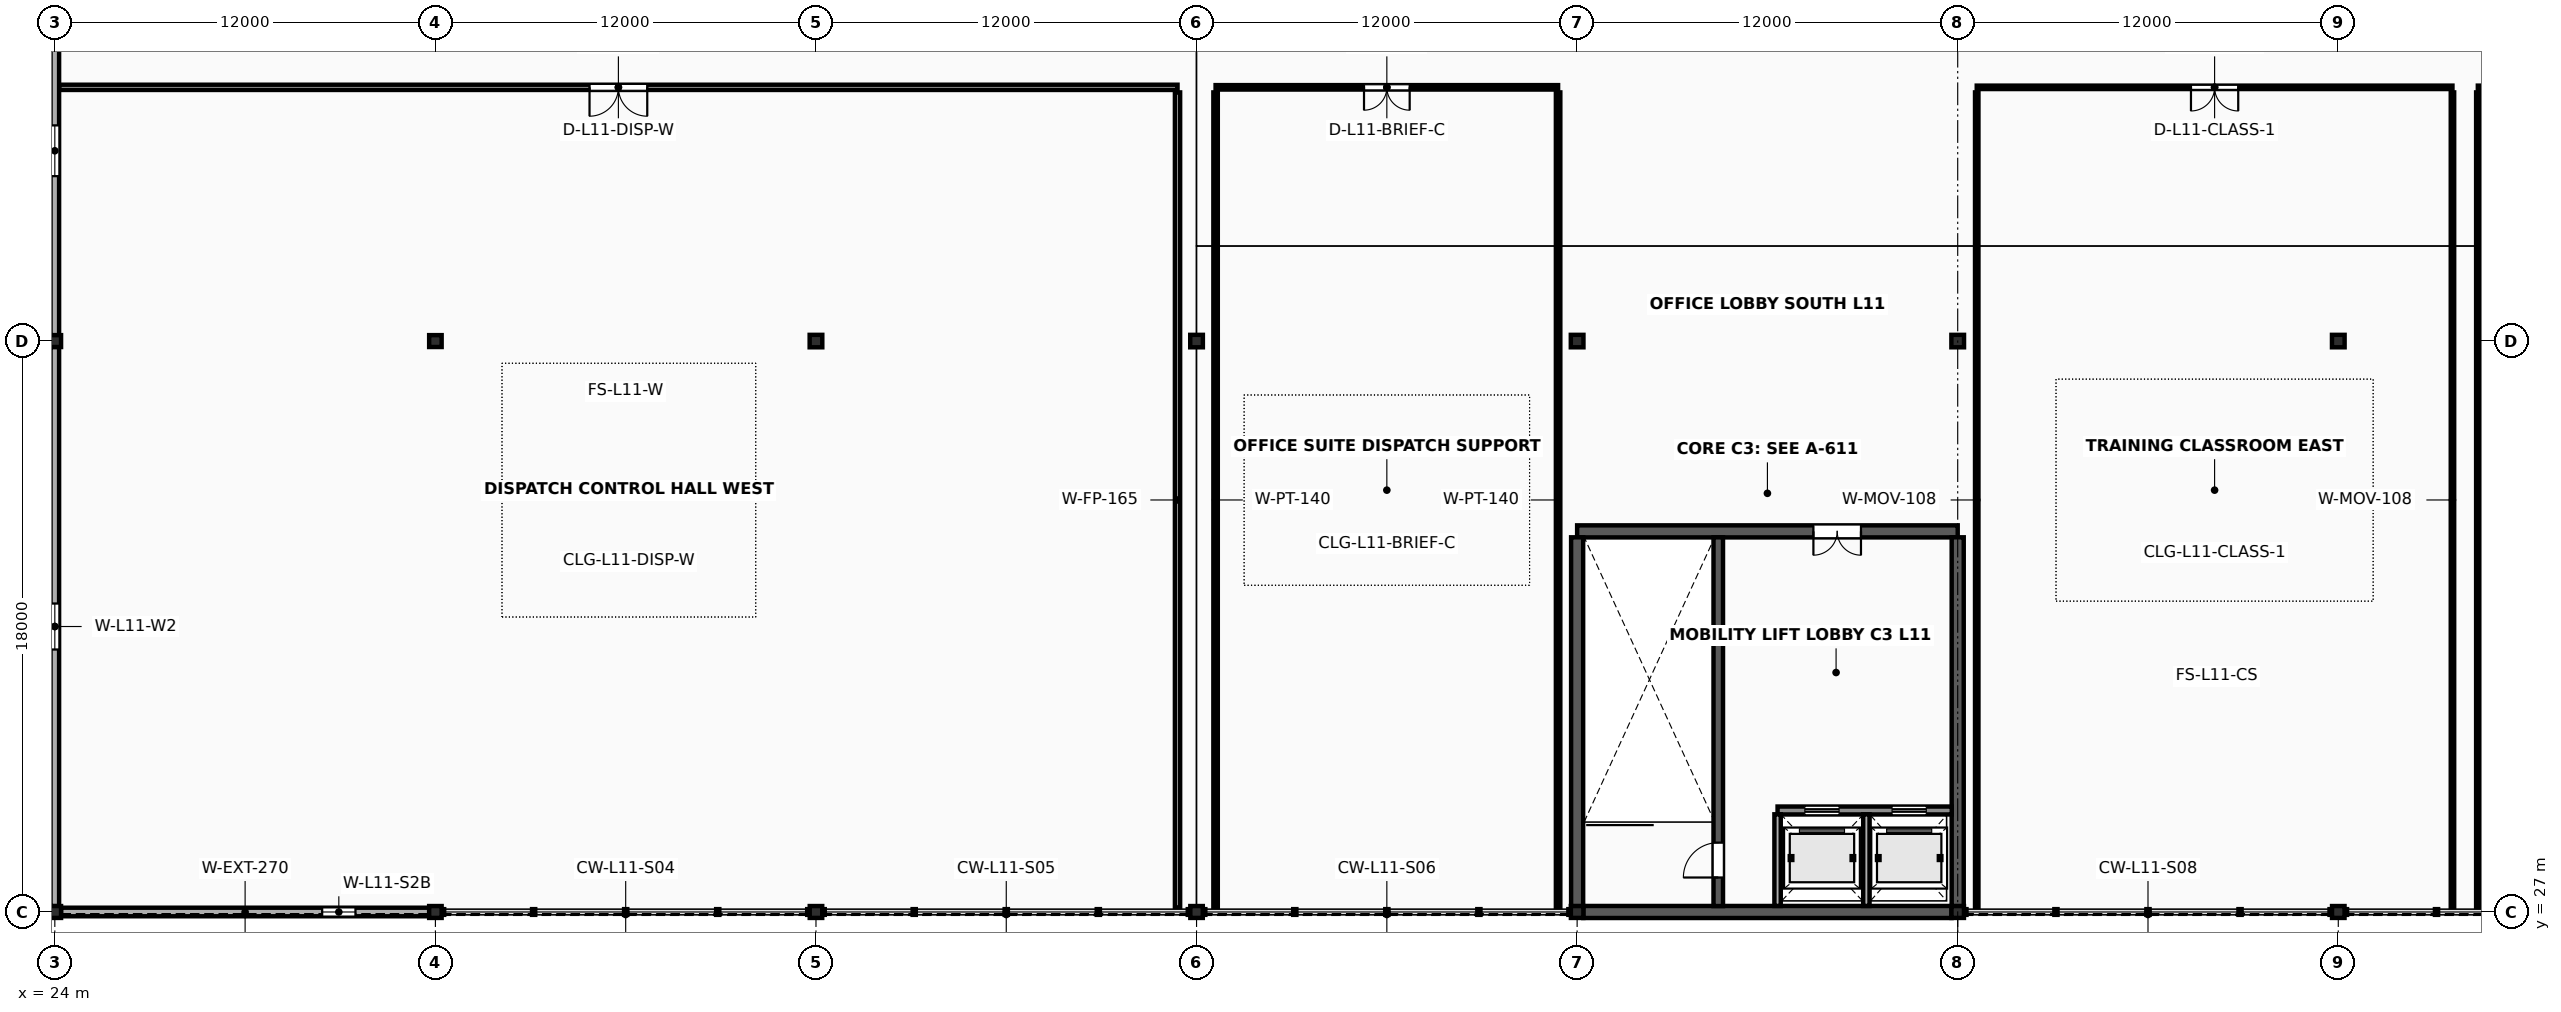
"""IFC4 building model, lengths in metres.
Left out: names, types, materials, properties, quantities, classifications, styles, units other than length and angle.
Written with IfcOpenShell. Run it as: python <this file> out.ifc"""

import sys

from ifc_helpers import new_model, si_unit, direction, frame, frame_2d, origin, origin_2d, place, context, subcontext, project, spatial, rectangle, i_section, extrude, element, fill, save


model = new_model("IFC4")
c1 = context("Model", 3, precision=1e-05, world=origin(), true_north=direction((0.0, 1.0)))
c2 = subcontext(c1, "Body", "Model", "MODEL_VIEW")
j1 = project(units=[si_unit("LENGTHUNIT", "METRE"), si_unit("PLANEANGLEUNIT", "RADIAN")], contexts=[c1])
p1 = place(None, origin())
s1 = spatial("IfcSite", under=j1, at=p1, CompositionType="ELEMENT")
p2 = place(p1, origin())
s2 = spatial("IfcBuilding", under=s1, at=p2, CompositionType="ELEMENT")
p3 = place(p2, frame((0.0, 0.0, 45.6)))
s3 = spatial("IfcBuildingStorey", under=s2, at=p3, CompositionType="ELEMENT", Elevation=45.6)
for number, where, z_axis, x_axis in (
    (1, (24.0, 27.0, 0.0), (0.0, 0.0, 1.0), (1.0, 0.0, 0.0)),
    (2, (24.0, 45.0, 0.0), (0.0, 0.0, 1.0), (1.0, 0.0, 0.0)),
    (3, (36.0, 27.0, 0.0), (0.0, 0.0, 1.0), (1.0, 0.0, 0.0)),
    (4, (36.0, 45.0, 0.0), (0.0, 0.0, 1.0), (1.0, 0.0, 0.0)),
    (5, (48.0, 27.0, 0.0), (0.0, 0.0, 1.0), (1.0, 0.0, 0.0)),
):
    element("IfcColumn", number, at=place(p3, frame(where, z_axis=z_axis, x_axis=x_axis)), inside=s3, PredefinedType="COLUMN", context=c2, shape_type="SweptSolid", body=[
        extrude(i_section(OverallWidth=0.394, OverallDepth=0.375, WebThickness=0.017, FlangeThickness=0.028, FilletRadius=0.018, at=origin_2d()), origin(), (0.0, 0.0, 1.0), 4.0),
    ])
p4 = place(p3, frame((48.0, 45.0, 0.0), z_axis=(0.0, 0.0, 1.0), x_axis=(1.0, 0.0, 0.0)))
e6 = element("IfcColumn", 6, at=p4, inside=s3, PredefinedType="COLUMN", context=c2, shape_type="SweptSolid", body=[
    extrude(i_section(OverallWidth=0.399, OverallDepth=0.393, WebThickness=0.023, FlangeThickness=0.037, FilletRadius=0.018, at=origin_2d()), origin(), (0.0, 0.0, 1.0), 4.0),
])
p5 = place(p3, frame((60.0, 27.0, 0.0), z_axis=(0.0, 0.0, 1.0), x_axis=(1.0, 0.0, 0.0)))
e7 = element("IfcColumn", 7, at=p5, inside=s3, PredefinedType="COLUMN", context=c2, shape_type="SweptSolid", body=[
    extrude(i_section(OverallWidth=0.394, OverallDepth=0.375, WebThickness=0.017, FlangeThickness=0.028, FilletRadius=0.018, at=origin_2d()), origin(), (0.0, 0.0, 1.0), 4.0),
])
p6 = place(p3, frame((60.0, 45.0, 0.0), z_axis=(0.0, 0.0, 1.0), x_axis=(1.0, 0.0, 0.0)))
e8 = element("IfcColumn", 8, at=p6, inside=s3, PredefinedType="COLUMN", context=c2, shape_type="SweptSolid", body=[
    extrude(i_section(OverallWidth=0.399, OverallDepth=0.393, WebThickness=0.023, FlangeThickness=0.037, FilletRadius=0.018, at=origin_2d()), origin(), (0.0, 0.0, 1.0), 4.0),
])
p7 = place(p3, frame((72.0, 27.0, 0.0), z_axis=(0.0, 0.0, 1.0), x_axis=(1.0, 0.0, 0.0)))
e9 = element("IfcColumn", 9, at=p7, inside=s3, PredefinedType="COLUMN", context=c2, shape_type="SweptSolid", body=[
    extrude(i_section(OverallWidth=0.394, OverallDepth=0.375, WebThickness=0.017, FlangeThickness=0.028, FilletRadius=0.018, at=origin_2d()), origin(), (0.0, 0.0, 1.0), 4.0),
])
p8 = place(p3, frame((72.0, 45.0, 0.0), z_axis=(0.0, 0.0, 1.0), x_axis=(1.0, 0.0, 0.0)))
e10 = element("IfcColumn", 10, at=p8, inside=s3, PredefinedType="COLUMN", context=c2, shape_type="SweptSolid", body=[
    extrude(i_section(OverallWidth=0.399, OverallDepth=0.393, WebThickness=0.023, FlangeThickness=0.037, FilletRadius=0.018, at=origin_2d()), origin(), (0.0, 0.0, 1.0), 4.0),
])
p9 = place(p3, frame((84.0, 27.0, 0.0), z_axis=(0.0, 0.0, 1.0), x_axis=(1.0, 0.0, 0.0)))
e11 = element("IfcColumn", 11, at=p9, inside=s3, PredefinedType="COLUMN", context=c2, shape_type="SweptSolid", body=[
    extrude(i_section(OverallWidth=0.394, OverallDepth=0.375, WebThickness=0.017, FlangeThickness=0.028, FilletRadius=0.018, at=origin_2d()), origin(), (0.0, 0.0, 1.0), 4.0),
])
p10 = place(p3, frame((84.0, 45.0, 0.0), z_axis=(0.0, 0.0, 1.0), x_axis=(1.0, 0.0, 0.0)))
e12 = element("IfcColumn", 12, at=p10, inside=s3, PredefinedType="COLUMN", context=c2, shape_type="SweptSolid", body=[
    extrude(i_section(OverallWidth=0.399, OverallDepth=0.393, WebThickness=0.023, FlangeThickness=0.037, FilletRadius=0.018, at=origin_2d()), origin(), (0.0, 0.0, 1.0), 4.0),
])
p11 = place(p3, frame((96.0, 27.0, 0.0), z_axis=(0.0, 0.0, 1.0), x_axis=(1.0, 0.0, 0.0)))
e13 = element("IfcColumn", 13, at=p11, inside=s3, PredefinedType="COLUMN", context=c2, shape_type="SweptSolid", body=[
    extrude(i_section(OverallWidth=0.394, OverallDepth=0.375, WebThickness=0.017, FlangeThickness=0.028, FilletRadius=0.018, at=origin_2d()), origin(), (0.0, 0.0, 1.0), 4.0),
])
p12 = place(p3, frame((96.0, 45.0, 0.0), z_axis=(0.0, 0.0, 1.0), x_axis=(1.0, 0.0, 0.0)))
e14 = element("IfcColumn", 14, at=p12, inside=s3, PredefinedType="COLUMN", context=c2, shape_type="SweptSolid", body=[
    extrude(i_section(OverallWidth=0.399, OverallDepth=0.393, WebThickness=0.023, FlangeThickness=0.037, FilletRadius=0.018, at=origin_2d()), origin(), (0.0, 0.0, 1.0), 4.0),
])
p13 = place(p3, frame((72.194, 27.0, 0.0), z_axis=(0.0, 0.0, 1.0), x_axis=(1.0, 0.0, 0.0)))
e15 = element("IfcWall", 15, at=p13, inside=s3, PredefinedType="SHEAR", context=c2, shape_type="SweptSolid", body=[
    extrude(rectangle(XDim=11.612, YDim=0.38, at=frame_2d((5.806, 0.0))), origin(), (0.0, 0.0, 1.0), 3.783),
])
p14 = place(p3, frame((72.0, 39.0, 0.0), z_axis=(0.0, 0.0, 1.0), x_axis=(1.0, 0.0, 0.0)))
e16 = element("IfcWall", 16, at=p14, inside=s3, PredefinedType="SHEAR", context=c2, shape_type="SweptSolid", body=[
    extrude(rectangle(XDim=12.0, YDim=0.38, at=frame_2d((6.0, 0.0))), origin(), (0.0, 0.0, 1.0), 3.783),
])
p15 = place(p14, frame((7.45, 0.0, 0.0)))
e17 = element("IfcOpeningElement", 17, at=p15, cuts=e16, PredefinedType="OPENING", context=c2, shape_type="SweptSolid", body=[
    extrude(rectangle(XDim=1.5, YDim=2.25, at=frame_2d((0.75, 1.125))), frame((0.0, 0.205, 0.0), z_axis=(0.0, -1.0, 0.0), x_axis=(1.0, 0.0, 0.0)), (0.0, 0.0, 1.0), 0.41),
])
for number, where, z_axis, x_axis in (
    (18, (72.0, 27.185, 0.0), (0.0, 0.0, 1.0), (0.0, 1.0, 0.0)),
    (19, (84.0, 27.185, 0.0), (0.0, 0.0, 1.0), (0.0, 1.0, 0.0)),
):
    element("IfcWall", number, at=place(p3, frame(where, z_axis=z_axis, x_axis=x_axis)), inside=s3, PredefinedType="SHEAR", context=c2, shape_type="SweptSolid", body=[
        extrude(rectangle(XDim=11.628, YDim=0.38, at=frame_2d((5.814, 0.0))), origin(), (0.0, 0.0, 1.0), 3.783),
    ])
p16 = place(p3, frame((76.45, 27.187, 0.0), z_axis=(0.0, 0.0, 1.0), x_axis=(0.0, 1.0, 0.0)))
e20 = element("IfcWall", 20, at=p16, inside=s3, PredefinedType="SHEAR", context=c2, shape_type="SweptSolid", body=[
    extrude(rectangle(XDim=11.626, YDim=0.3, at=frame_2d((5.813, 0.0))), origin(), (0.0, 0.0, 1.0), 3.783),
])
p17 = place(p16, frame((0.9, 0.0, 0.0)))
e21 = element("IfcOpeningElement", 21, at=p17, cuts=e20, PredefinedType="OPENING", context=c2, shape_type="SweptSolid", body=[
    extrude(rectangle(XDim=1.1, YDim=2.2, at=frame_2d((0.55, 1.1))), frame((0.0, 0.165, 0.0), z_axis=(0.0, -1.0, 0.0), x_axis=(1.0, 0.0, 0.0)), (0.0, 0.0, 1.0), 0.33),
])
p18 = place(p3, frame((78.32, 30.2, 0.0), z_axis=(0.0, 0.0, 1.0), x_axis=(1.0, 0.0, 0.0)))
e22 = element("IfcWall", 22, at=p18, inside=s3, PredefinedType="SOLIDWALL", context=c2, shape_type="SweptSolid", body=[
    extrude(rectangle(XDim=5.493, YDim=0.25, at=frame_2d((2.747, 0.0))), origin(), (0.0, 0.0, 1.0), 3.783),
])
p19 = place(p18, frame((0.86, 0.0, 0.0)))
e23 = element("IfcOpeningElement", 23, at=p19, cuts=e22, PredefinedType="OPENING", context=c2, shape_type="SweptSolid", body=[
    extrude(rectangle(XDim=1.08, YDim=2.22, at=frame_2d((0.54, 1.11))), frame((0.0, 0.14, 0.0), z_axis=(0.0, -1.0, 0.0), x_axis=(1.0, 0.0, 0.0)), (0.0, 0.0, 1.0), 0.28),
])
p20 = place(p18, frame((3.61, 0.0, 0.0)))
e24 = element("IfcOpeningElement", 24, at=p20, cuts=e22, PredefinedType="OPENING", context=c2, shape_type="SweptSolid", body=[
    extrude(rectangle(XDim=1.08, YDim=2.22, at=frame_2d((0.54, 1.11))), frame((0.0, 0.14, 0.0), z_axis=(0.0, -1.0, 0.0), x_axis=(1.0, 0.0, 0.0)), (0.0, 0.0, 1.0), 0.28),
])
for number, where, z_axis, x_axis in (
    (25, (78.32, 27.19, 0.0), (0.0, 0.0, 1.0), (0.0, 1.0, 0.0)),
    (26, (81.12, 27.19, 0.0), (0.0, 0.0, 1.0), (0.0, 1.0, 0.0)),
):
    element("IfcWall", number, at=place(p3, frame(where, z_axis=z_axis, x_axis=x_axis)), inside=s3, PredefinedType="SOLIDWALL", context=c2, shape_type="SweptSolid", body=[
        extrude(rectangle(XDim=2.89, YDim=0.2, at=frame_2d((1.445, 0.0))), origin(), (0.0, 0.0, 1.0), 3.773),
    ])
p21 = place(p3, frame((24.195, 27.0, 0.0), z_axis=(0.0, 0.0, 1.0), x_axis=(1.0, 0.0, 0.0)))
e27 = element("IfcWall", 27, at=p21, inside=s3, PredefinedType="SOLIDWALL", context=c2, shape_type="SweptSolid", body=[
    extrude(rectangle(XDim=11.61, YDim=0.27, at=frame_2d((5.805, 0.0))), origin(), (0.0, 0.0, 1.0), 3.236),
])
p22 = place(p21, frame((8.235, 0.0, 0.78)))
e28 = element("IfcOpeningElement", 28, at=p22, cuts=e27, PredefinedType="OPENING", context=c2, shape_type="SweptSolid", body=[
    extrude(rectangle(XDim=1.05, YDim=1.25, at=frame_2d((0.525, 0.625))), frame((0.0, 0.15, 0.0), z_axis=(0.0, -1.0, 0.0), x_axis=(1.0, 0.0, 0.0)), (0.0, 0.0, 1.0), 0.3),
])
p23 = place(p3, frame((24.0, 27.186, 0.0), z_axis=(0.0, 0.0, 1.0), x_axis=(0.0, 1.0, 0.0)))
e29 = element("IfcWall", 29, at=p23, inside=s3, PredefinedType="SOLIDWALL", context=c2, shape_type="SweptSolid", body=[
    extrude(rectangle(XDim=17.629, YDim=0.27, at=frame_2d((8.814, 0.0))), origin(), (0.0, 0.0, 1.0), 3.236),
])
p24 = place(p23, frame((8.09, 0.0, 0.78)))
e30 = element("IfcOpeningElement", 30, at=p24, cuts=e29, PredefinedType="OPENING", context=c2, shape_type="SweptSolid", body=[
    extrude(rectangle(XDim=1.45, YDim=1.25, at=frame_2d((0.725, 0.625))), frame((0.0, 0.15, 0.0), z_axis=(0.0, -1.0, 0.0), x_axis=(1.0, 0.0, 0.0)), (0.0, 0.0, 1.0), 0.3),
])
p25 = place(p3, frame((24.0, 45.186, 0.0), z_axis=(0.0, 0.0, 1.0), x_axis=(0.0, 1.0, 0.0)))
e31 = element("IfcWall", 31, at=p25, inside=s3, PredefinedType="SOLIDWALL", context=c2, shape_type="SweptSolid", body=[
    extrude(rectangle(XDim=11.629, YDim=0.27, at=frame_2d((5.814, 0.0))), origin(), (0.0, 0.0, 1.0), 3.236),
])
p26 = place(p25, frame((5.014, 0.0, 0.78)))
e32 = element("IfcOpeningElement", 32, at=p26, cuts=e31, PredefinedType="OPENING", context=c2, shape_type="SweptSolid", body=[
    extrude(rectangle(XDim=1.6, YDim=1.25, at=frame_2d((0.8, 0.625))), frame((0.0, 0.15, 0.0), z_axis=(0.0, -1.0, 0.0), x_axis=(1.0, 0.0, 0.0)), (0.0, 0.0, 1.0), 0.3),
])
p27 = place(p3, frame((24.14, 53.0, 0.0), z_axis=(0.0, 0.0, 1.0), x_axis=(1.0, 0.0, 0.0)))
e33 = element("IfcWall", 33, at=p27, inside=s3, PredefinedType="PARTITIONING", context=c2, shape_type="SweptSolid", body=[
    extrude(rectangle(XDim=35.26, YDim=0.165, at=frame_2d((17.63, 0.0))), origin(), (0.0, 0.0, 1.0), 2.88),
])
p28 = place(p27, frame((16.72, 0.0, 0.0)))
e34 = element("IfcOpeningElement", 34, at=p28, cuts=e33, PredefinedType="OPENING", context=c2, shape_type="SweptSolid", body=[
    extrude(rectangle(XDim=1.82, YDim=2.36, at=frame_2d((0.91, 1.18))), frame((0.0, 0.097, 0.0), z_axis=(0.0, -1.0, 0.0), x_axis=(1.0, 0.0, 0.0)), (0.0, 0.0, 1.0), 0.195),
])
p29 = place(p3, frame((59.4, 27.14, 0.0), z_axis=(0.0, 0.0, 1.0), x_axis=(0.0, 1.0, 0.0)))
e35 = element("IfcWall", 35, at=p29, inside=s3, PredefinedType="PARTITIONING", context=c2, shape_type="SweptSolid", body=[
    extrude(rectangle(XDim=25.7, YDim=0.165, at=frame_2d((12.85, 0.0))), origin(), (0.0, 0.0, 1.0), 2.88),
])
p30 = place(p3, frame((60.6, 53.0, 0.0), z_axis=(0.0, 0.0, 1.0), x_axis=(1.0, 0.0, 0.0)))
e36 = element("IfcWall", 36, at=p30, inside=s3, PredefinedType="PARTITIONING", context=c2, shape_type="SweptSolid", body=[
    extrude(rectangle(XDim=10.8, YDim=0.14, at=frame_2d((5.4, 0.0))), origin(), (0.0, 0.0, 1.0), 2.88),
])
p31 = place(p30, frame((4.68, 0.0, 0.0)))
e37 = element("IfcOpeningElement", 37, at=p31, cuts=e36, PredefinedType="OPENING", context=c2, shape_type="SweptSolid", body=[
    extrude(rectangle(XDim=1.44, YDim=2.26, at=frame_2d((0.72, 1.13))), frame((0.0, 0.085, 0.0), z_axis=(0.0, -1.0, 0.0), x_axis=(1.0, 0.0, 0.0)), (0.0, 0.0, 1.0), 0.17),
])
for number, where, z_axis, x_axis in (
    (38, (60.6, 27.14, 0.0), (0.0, 0.0, 1.0), (0.0, 1.0, 0.0)),
    (39, (71.4, 27.14, 0.0), (0.0, 0.0, 1.0), (0.0, 1.0, 0.0)),
):
    element("IfcWall", number, at=place(p3, frame(where, z_axis=z_axis, x_axis=x_axis)), inside=s3, PredefinedType="PARTITIONING", context=c2, shape_type="SweptSolid", body=[
        extrude(rectangle(XDim=25.7, YDim=0.14, at=frame_2d((12.85, 0.0))), origin(), (0.0, 0.0, 1.0), 2.88),
    ])
p32 = place(p3, frame((84.6, 53.0, 0.0), z_axis=(0.0, 0.0, 1.0), x_axis=(1.0, 0.0, 0.0)))
e40 = element("IfcWall", 40, at=p32, inside=s3, PredefinedType="MOVABLE", context=c2, shape_type="SweptSolid", body=[
    extrude(rectangle(XDim=15.0, YDim=0.108, at=frame_2d((7.5, 0.0))), origin(), (0.0, 0.0, 1.0), 2.88),
])
p33 = place(p32, frame((6.755, 0.0, 0.0)))
e41 = element("IfcOpeningElement", 41, at=p33, cuts=e40, PredefinedType="OPENING", context=c2, shape_type="SweptSolid", body=[
    extrude(rectangle(XDim=1.49, YDim=2.28, at=frame_2d((0.745, 1.14))), frame((0.0, 0.069, 0.0), z_axis=(0.0, -1.0, 0.0), x_axis=(1.0, 0.0, 0.0)), (0.0, 0.0, 1.0), 0.138),
])
for number, where, z_axis, x_axis in (
    (42, (84.6, 27.14, 0.0), (0.0, 0.0, 1.0), (0.0, 1.0, 0.0)),
    (43, (99.6, 27.14, 0.0), (0.0, 0.0, 1.0), (0.0, 1.0, 0.0)),
):
    element("IfcWall", number, at=place(p3, frame(where, z_axis=z_axis, x_axis=x_axis)), inside=s3, PredefinedType="MOVABLE", context=c2, shape_type="SweptSolid", body=[
        extrude(rectangle(XDim=25.7, YDim=0.108, at=frame_2d((12.85, 0.0))), origin(), (0.0, 0.0, 1.0), 2.88),
    ])
p34 = place(p3, frame((100.4, 53.0, 0.0), z_axis=(0.0, 0.0, 1.0), x_axis=(1.0, 0.0, 0.0)))
e44 = element("IfcWall", 44, at=p34, inside=s3, PredefinedType="MOVABLE", context=c2, shape_type="SweptSolid", body=[
    extrude(rectangle(XDim=43.46, YDim=0.108, at=frame_2d((21.73, 0.0))), origin(), (0.0, 0.0, 1.0), 2.88),
])
p35 = place(p34, frame((20.955, 0.0, 0.0)))
e45 = element("IfcOpeningElement", 45, at=p35, cuts=e44, PredefinedType="OPENING", context=c2, shape_type="SweptSolid", body=[
    extrude(rectangle(XDim=1.55, YDim=2.31, at=frame_2d((0.775, 1.155))), frame((0.0, 0.069, 0.0), z_axis=(0.0, -1.0, 0.0), x_axis=(1.0, 0.0, 0.0)), (0.0, 0.0, 1.0), 0.138),
])
p36 = place(p3, frame((100.4, 27.14, 0.0), z_axis=(0.0, 0.0, 1.0), x_axis=(0.0, 1.0, 0.0)))
e46 = element("IfcWall", 46, at=p36, inside=s3, PredefinedType="MOVABLE", context=c2, shape_type="SweptSolid", body=[
    extrude(rectangle(XDim=25.7, YDim=0.108, at=frame_2d((12.85, 0.0))), origin(), (0.0, 0.0, 1.0), 2.88),
])
p37 = place(p22, origin())
e47 = element("IfcWindow", 47, at=p37, inside=s3, PartitioningType="SINGLE_PANEL", PredefinedType="WINDOW", context=c2, shape_type="SweptSolid", body=[
    extrude(rectangle(XDim=1.05, YDim=1.25, at=frame_2d((0.525, 0.625))), frame((0.0, 0.03, 0.0), z_axis=(0.0, -1.0, 0.0), x_axis=(1.0, 0.0, 0.0)), (0.0, 0.0, 1.0), 0.06),
])
fill(e28, e47)
p38 = place(p24, origin())
e48 = element("IfcWindow", 48, at=p38, inside=s3, PartitioningType="SINGLE_PANEL", PredefinedType="WINDOW", context=c2, shape_type="SweptSolid", body=[
    extrude(rectangle(XDim=1.45, YDim=1.25, at=frame_2d((0.725, 0.625))), frame((0.0, 0.03, 0.0), z_axis=(0.0, -1.0, 0.0), x_axis=(1.0, 0.0, 0.0)), (0.0, 0.0, 1.0), 0.06),
])
fill(e30, e48)
p39 = place(p26, origin())
e49 = element("IfcWindow", 49, at=p39, inside=s3, PartitioningType="SINGLE_PANEL", PredefinedType="WINDOW", context=c2, shape_type="SweptSolid", body=[
    extrude(rectangle(XDim=1.6, YDim=1.25, at=frame_2d((0.8, 0.625))), frame((0.0, 0.03, 0.0), z_axis=(0.0, -1.0, 0.0), x_axis=(1.0, 0.0, 0.0)), (0.0, 0.0, 1.0), 0.06),
])
fill(e32, e49)
p40 = place(p17, origin())
e50 = element("IfcDoor", 50, at=p40, inside=s3, OperationType="SINGLE_SWING_LEFT", PredefinedType="DOOR", context=c2, shape_type="SweptSolid", body=[
    extrude(rectangle(XDim=1.1, YDim=2.2, at=frame_2d((0.55, 1.1))), frame((0.0, 0.025, 0.0), z_axis=(0.0, -1.0, 0.0), x_axis=(1.0, 0.0, 0.0)), (0.0, 0.0, 1.0), 0.05),
])
fill(e21, e50)
p41 = place(p15, origin())
e51 = element("IfcDoor", 51, at=p41, inside=s3, OperationType="DOUBLE_DOOR_SINGLE_SWING", PredefinedType="DOOR", context=c2, shape_type="SweptSolid", body=[
    extrude(rectangle(XDim=1.5, YDim=2.25, at=frame_2d((0.75, 1.125))), frame((0.0, 0.025, 0.0), z_axis=(0.0, -1.0, 0.0), x_axis=(1.0, 0.0, 0.0)), (0.0, 0.0, 1.0), 0.05),
])
fill(e17, e51)
p42 = place(p19, origin())
e52 = element("IfcDoor", 52, at=p42, inside=s3, OperationType="SLIDING_TO_LEFT", PredefinedType="USERDEFINED", context=c2, shape_type="SweptSolid", body=[
    extrude(rectangle(XDim=1.08, YDim=2.22, at=frame_2d((0.54, 1.11))), frame((0.0, 0.025, 0.0), z_axis=(0.0, -1.0, 0.0), x_axis=(1.0, 0.0, 0.0)), (0.0, 0.0, 1.0), 0.05),
])
fill(e23, e52)
p43 = place(p20, origin())
e53 = element("IfcDoor", 53, at=p43, inside=s3, OperationType="SLIDING_TO_LEFT", PredefinedType="USERDEFINED", context=c2, shape_type="SweptSolid", body=[
    extrude(rectangle(XDim=1.08, YDim=2.22, at=frame_2d((0.54, 1.11))), frame((0.0, 0.025, 0.0), z_axis=(0.0, -1.0, 0.0), x_axis=(1.0, 0.0, 0.0)), (0.0, 0.0, 1.0), 0.05),
])
fill(e24, e53)
p44 = place(p28, origin())
e54 = element("IfcDoor", 54, at=p44, inside=s3, OperationType="DOUBLE_DOOR_SINGLE_SWING", PredefinedType="DOOR", context=c2, shape_type="SweptSolid", body=[
    extrude(rectangle(XDim=1.82, YDim=2.36, at=frame_2d((0.91, 1.18))), frame((0.0, 0.025, 0.0), z_axis=(0.0, -1.0, 0.0), x_axis=(1.0, 0.0, 0.0)), (0.0, 0.0, 1.0), 0.05),
])
fill(e34, e54)
p45 = place(p31, origin())
e55 = element("IfcDoor", 55, at=p45, inside=s3, OperationType="DOUBLE_DOOR_SINGLE_SWING", PredefinedType="DOOR", context=c2, shape_type="SweptSolid", body=[
    extrude(rectangle(XDim=1.44, YDim=2.26, at=frame_2d((0.72, 1.13))), frame((0.0, 0.025, 0.0), z_axis=(0.0, -1.0, 0.0), x_axis=(1.0, 0.0, 0.0)), (0.0, 0.0, 1.0), 0.05),
])
fill(e37, e55)
p46 = place(p33, origin())
e56 = element("IfcDoor", 56, at=p46, inside=s3, OperationType="DOUBLE_DOOR_SINGLE_SWING", PredefinedType="DOOR", context=c2, shape_type="SweptSolid", body=[
    extrude(rectangle(XDim=1.49, YDim=2.28, at=frame_2d((0.745, 1.14))), frame((0.0, 0.025, 0.0), z_axis=(0.0, -1.0, 0.0), x_axis=(1.0, 0.0, 0.0)), (0.0, 0.0, 1.0), 0.05),
])
fill(e41, e56)
save(model, sys.argv[1])
